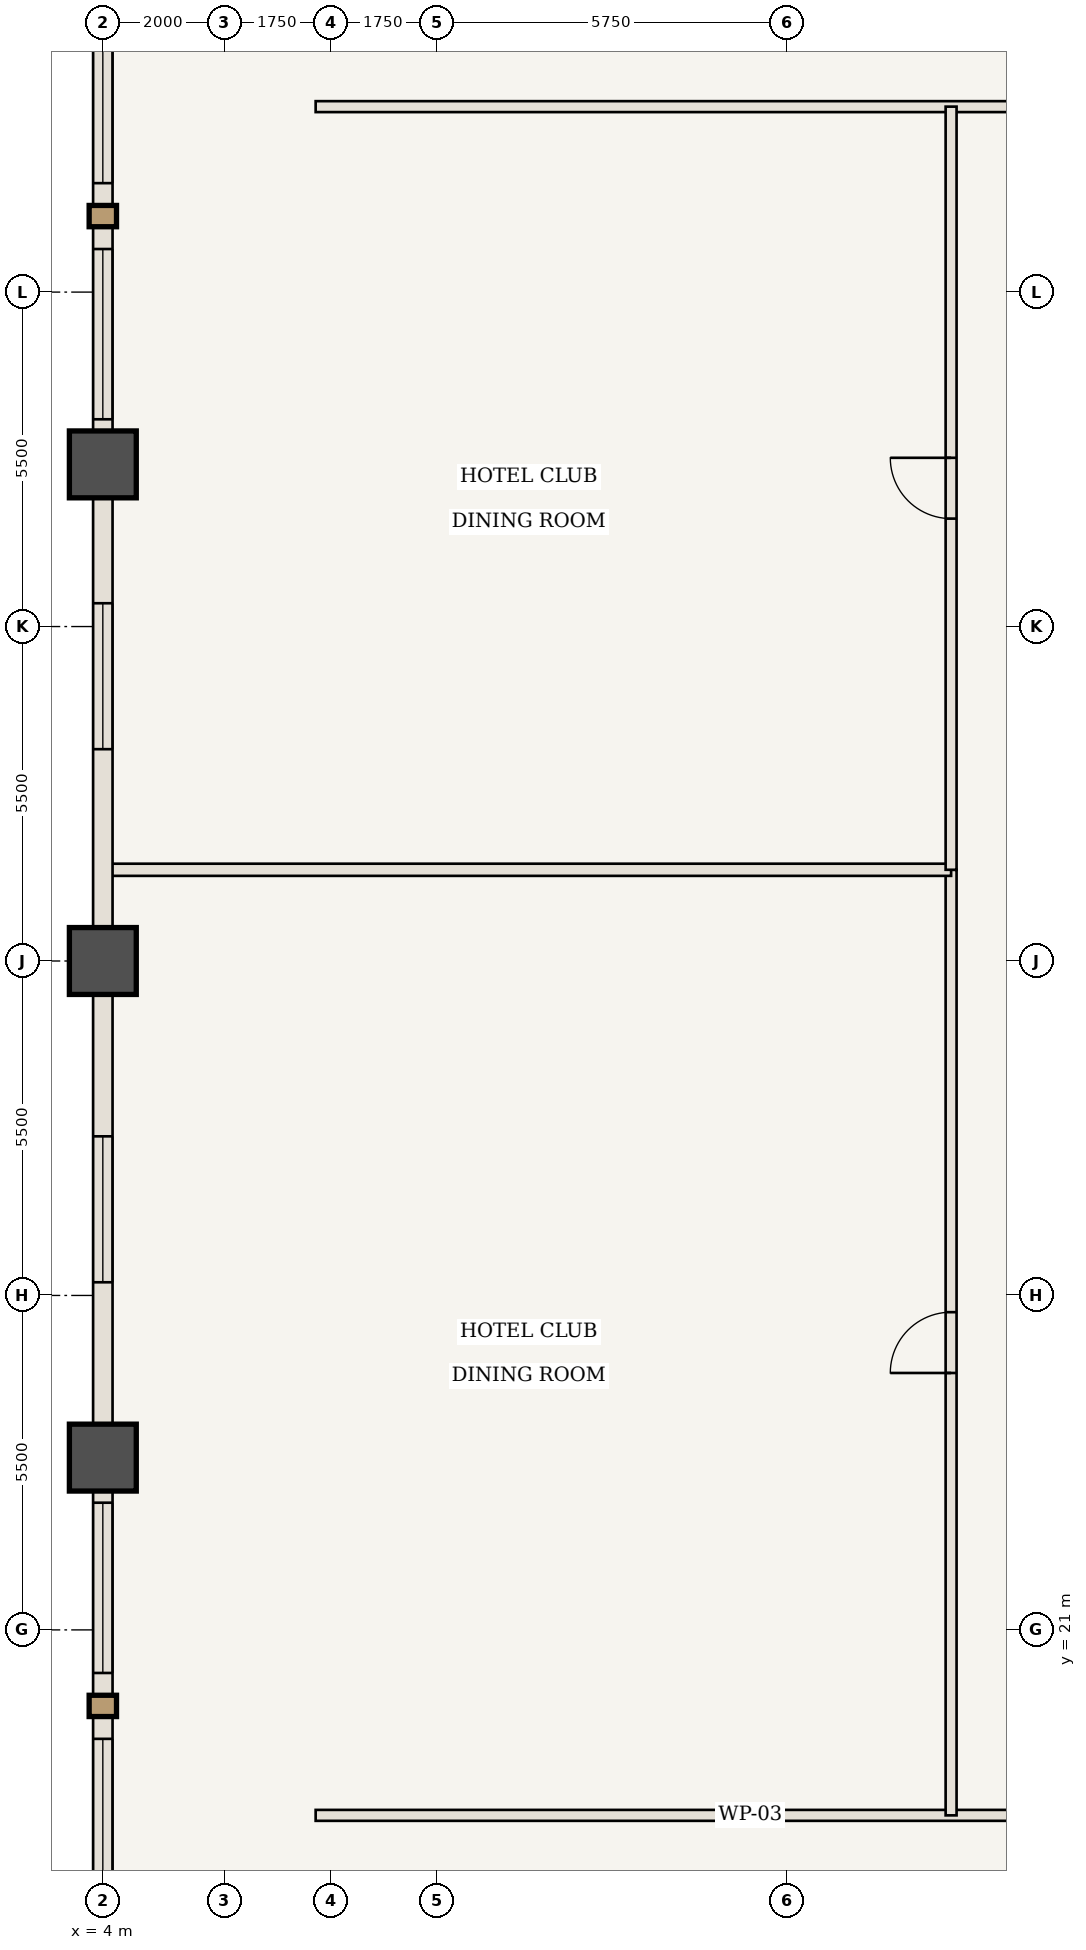
"""IFC4 building model, lengths in metres.
Left out: names, types, materials, properties, quantities, classifications, styles, units other than length and angle.
Written with IfcOpenShell. Run it as: python <this file> out.ifc"""

import sys

from ifc_helpers import new_model, si_unit, direction, frame, frame_2d, origin, origin_2d, place, context, subcontext, project, spatial, rectangle, extrude, element, fill, save


model = new_model("IFC4")
c1 = context("Model", 3, precision=1e-05, world=origin(), true_north=direction((0.0, 1.0)))
c2 = subcontext(c1, "Body", "Model", "MODEL_VIEW")
j1 = project(units=[si_unit("LENGTHUNIT", "METRE"), si_unit("PLANEANGLEUNIT", "RADIAN")], contexts=[c1])
p1 = place(None, origin())
s1 = spatial("IfcSite", under=j1, at=p1, CompositionType="ELEMENT")
p2 = place(p1, origin())
s2 = spatial("IfcBuilding", under=s1, at=p2, CompositionType="ELEMENT")
p3 = place(p2, frame((0.0, 0.0, 66.85)))
s3 = spatial("IfcBuildingStorey", under=s2, at=p3, CompositionType="ELEMENT", Elevation=66.85)
for number, where, z_axis, x_axis in (
    (1, (4.0, 23.833, 0.0), (0.0, 0.0, 1.0), (1.0, 0.0, 0.0)),
    (2, (4.0, 32.0, 0.0), (0.0, 0.0, 1.0), (1.0, 0.0, 0.0)),
    (3, (4.0, 40.167, 0.0), (0.0, 0.0, 1.0), (1.0, 0.0, 0.0)),
):
    element("IfcColumn", number, at=place(p3, frame(where, z_axis=z_axis, x_axis=x_axis)), inside=s3, PredefinedType="COLUMN", context=c2, shape_type="SweptSolid", body=[
        extrude(rectangle(XDim=1.1, YDim=1.1, at=origin_2d()), origin(), (0.0, 0.0, 1.0), 3.5),
    ])
p4 = place(p3, frame((7.5, 17.95, 0.0), z_axis=(0.0, 0.0, 1.0), x_axis=(1.0, 0.0, 0.0)))
e4 = element("IfcWall", 4, at=p4, inside=s3, PredefinedType="STANDARD", context=c2, shape_type="SweptSolid", body=[
    extrude(rectangle(XDim=14.3, YDim=0.18, at=frame_2d((7.15, 0.0))), origin(), (0.0, 0.0, 1.0), 3.32),
])
p5 = place(p4, frame((11.9, 0.0, 0.0)))
e5 = element("IfcOpeningElement", 5, at=p5, cuts=e4, PredefinedType="OPENING", context=c2, shape_type="SweptSolid", body=[
    extrude(rectangle(XDim=1.0, YDim=2.15, at=frame_2d((0.5, 1.075))), frame((0.0, 0.1, 0.0), z_axis=(0.0, -1.0, 0.0), x_axis=(1.0, 0.0, 0.0)), (0.0, 0.0, 1.0), 0.2),
])
p6 = place(p3, frame((7.5, 46.05, 0.0), z_axis=(0.0, 0.0, 1.0), x_axis=(1.0, 0.0, 0.0)))
e6 = element("IfcWall", 6, at=p6, inside=s3, PredefinedType="STANDARD", context=c2, shape_type="SweptSolid", body=[
    extrude(rectangle(XDim=16.7, YDim=0.18, at=frame_2d((8.35, 0.0))), origin(), (0.0, 0.0, 1.0), 3.32),
])
p7 = place(p6, frame((11.65, 0.0, 0.0)))
e7 = element("IfcOpeningElement", 7, at=p7, cuts=e6, PredefinedType="OPENING", context=c2, shape_type="SweptSolid", body=[
    extrude(rectangle(XDim=1.0, YDim=2.15, at=frame_2d((0.5, 1.075))), frame((0.0, 0.1, 0.0), z_axis=(0.0, -1.0, 0.0), x_axis=(1.0, 0.0, 0.0)), (0.0, 0.0, 1.0), 0.2),
])
p8 = place(p3, frame((17.95, 17.95, 0.0), z_axis=(0.0, 0.0, 1.0), x_axis=(0.0, 1.0, 0.0)))
e8 = element("IfcWall", 8, at=p8, inside=s3, PredefinedType="STANDARD", context=c2, shape_type="SweptSolid", body=[
    extrude(rectangle(XDim=15.55, YDim=0.18, at=frame_2d((7.775, 0.0))), origin(), (0.0, 0.0, 1.0), 3.32),
])
p9 = place(p8, frame((7.275, 0.0, 0.0)))
e9 = element("IfcOpeningElement", 9, at=p9, cuts=e8, PredefinedType="OPENING", context=c2, shape_type="SweptSolid", body=[
    extrude(rectangle(XDim=1.0, YDim=2.15, at=frame_2d((0.5, 1.075))), frame((0.0, 0.1, 0.0), z_axis=(0.0, -1.0, 0.0), x_axis=(1.0, 0.0, 0.0)), (0.0, 0.0, 1.0), 0.2),
])
p10 = place(p3, frame((4.06, 33.5, 0.0), z_axis=(0.0, 0.0, 1.0), x_axis=(1.0, 0.0, 0.0)))
e10 = element("IfcWall", 10, at=p10, inside=s3, PredefinedType="STANDARD", context=c2, shape_type="SweptSolid", body=[
    extrude(rectangle(XDim=13.89, YDim=0.2, at=frame_2d((6.945, 0.0))), origin(), (0.0, 0.0, 1.0), 3.32),
])
p11 = place(p3, frame((17.95, 33.5, 0.0), z_axis=(0.0, 0.0, 1.0), x_axis=(0.0, 1.0, 0.0)))
e11 = element("IfcWall", 11, at=p11, inside=s3, PredefinedType="STANDARD", context=c2, shape_type="SweptSolid", body=[
    extrude(rectangle(XDim=12.55, YDim=0.18, at=frame_2d((6.275, 0.0))), origin(), (0.0, 0.0, 1.0), 3.32),
])
p12 = place(p11, frame((5.775, 0.0, 0.0)))
e12 = element("IfcOpeningElement", 12, at=p12, cuts=e11, PredefinedType="OPENING", context=c2, shape_type="SweptSolid", body=[
    extrude(rectangle(XDim=1.0, YDim=2.15, at=frame_2d((0.5, 1.075))), frame((0.0, 0.1, 0.0), z_axis=(0.0, -1.0, 0.0), x_axis=(1.0, 0.0, 0.0)), (0.0, 0.0, 1.0), 0.2),
])
p13 = place(p3, frame((4.0, 15.667, 0.0), z_axis=(0.0, 0.0, 1.0), x_axis=(0.0, 1.0, 0.0)))
e13 = element("IfcWall", 13, at=p13, inside=s3, PredefinedType="USERDEFINED", context=c2, shape_type="SweptSolid", body=[
    extrude(rectangle(XDim=8.167, YDim=0.32, at=frame_2d((4.083, 0.0))), origin(), (0.0, 0.0, 1.0), 2.52),
])
p14 = place(p13, frame((0.742, 0.0, 0.85)))
e14 = element("IfcOpeningElement", 14, at=p14, cuts=e13, PredefinedType="OPENING", context=c2, shape_type="SweptSolid", body=[
    extrude(rectangle(XDim=2.8, YDim=1.47, at=frame_2d((1.4, 0.735))), frame((0.0, 0.17, 0.0), z_axis=(0.0, -1.0, 0.0), x_axis=(1.0, 0.0, 0.0)), (0.0, 0.0, 1.0), 0.34),
])
p15 = place(p13, frame((4.625, 0.0, 0.85)))
e15 = element("IfcOpeningElement", 15, at=p15, cuts=e13, PredefinedType="OPENING", context=c2, shape_type="SweptSolid", body=[
    extrude(rectangle(XDim=2.8, YDim=1.47, at=frame_2d((1.4, 0.735))), frame((0.0, 0.17, 0.0), z_axis=(0.0, -1.0, 0.0), x_axis=(1.0, 0.0, 0.0)), (0.0, 0.0, 1.0), 0.34),
])
p16 = place(p3, frame((4.0, 23.833, 0.0), z_axis=(0.0, 0.0, 1.0), x_axis=(0.0, 1.0, 0.0)))
e16 = element("IfcWall", 16, at=p16, inside=s3, PredefinedType="USERDEFINED", context=c2, shape_type="SweptSolid", body=[
    extrude(rectangle(XDim=8.167, YDim=0.32, at=frame_2d((4.083, 0.0))), origin(), (0.0, 0.0, 1.0), 2.52),
])
p17 = place(p16, frame((2.883, 0.0, 0.85)))
e17 = element("IfcOpeningElement", 17, at=p17, cuts=e16, PredefinedType="OPENING", context=c2, shape_type="SweptSolid", body=[
    extrude(rectangle(XDim=2.4, YDim=1.47, at=frame_2d((1.2, 0.735))), frame((0.0, 0.17, 0.0), z_axis=(0.0, -1.0, 0.0), x_axis=(1.0, 0.0, 0.0)), (0.0, 0.0, 1.0), 0.34),
])
p18 = place(p3, frame((4.0, 32.0, 0.0), z_axis=(0.0, 0.0, 1.0), x_axis=(0.0, 1.0, 0.0)))
e18 = element("IfcWall", 18, at=p18, inside=s3, PredefinedType="USERDEFINED", context=c2, shape_type="SweptSolid", body=[
    extrude(rectangle(XDim=8.167, YDim=0.32, at=frame_2d((4.083, 0.0))), origin(), (0.0, 0.0, 1.0), 2.52),
])
p19 = place(p18, frame((3.483, 0.0, 0.85)))
e19 = element("IfcOpeningElement", 19, at=p19, cuts=e18, PredefinedType="OPENING", context=c2, shape_type="SweptSolid", body=[
    extrude(rectangle(XDim=2.4, YDim=1.47, at=frame_2d((1.2, 0.735))), frame((0.0, 0.17, 0.0), z_axis=(0.0, -1.0, 0.0), x_axis=(1.0, 0.0, 0.0)), (0.0, 0.0, 1.0), 0.34),
])
p20 = place(p3, frame((4.0, 40.167, 0.0), z_axis=(0.0, 0.0, 1.0), x_axis=(0.0, 1.0, 0.0)))
e20 = element("IfcWall", 20, at=p20, inside=s3, PredefinedType="USERDEFINED", context=c2, shape_type="SweptSolid", body=[
    extrude(rectangle(XDim=8.167, YDim=0.32, at=frame_2d((4.083, 0.0))), origin(), (0.0, 0.0, 1.0), 2.52),
])
p21 = place(p20, frame((0.742, 0.0, 0.85)))
e21 = element("IfcOpeningElement", 21, at=p21, cuts=e20, PredefinedType="OPENING", context=c2, shape_type="SweptSolid", body=[
    extrude(rectangle(XDim=2.8, YDim=1.47, at=frame_2d((1.4, 0.735))), frame((0.0, 0.17, 0.0), z_axis=(0.0, -1.0, 0.0), x_axis=(1.0, 0.0, 0.0)), (0.0, 0.0, 1.0), 0.34),
])
p22 = place(p20, frame((4.625, 0.0, 0.85)))
e22 = element("IfcOpeningElement", 22, at=p22, cuts=e20, PredefinedType="OPENING", context=c2, shape_type="SweptSolid", body=[
    extrude(rectangle(XDim=2.8, YDim=1.47, at=frame_2d((1.4, 0.735))), frame((0.0, 0.17, 0.0), z_axis=(0.0, -1.0, 0.0), x_axis=(1.0, 0.0, 0.0)), (0.0, 0.0, 1.0), 0.34),
])
p23 = place(p9, origin())
e23 = element("IfcDoor", 23, at=p23, inside=s3, OperationType="SINGLE_SWING_LEFT", PredefinedType="DOOR", context=c2, shape_type="SweptSolid", body=[
    extrude(rectangle(XDim=1.0, YDim=2.15, at=frame_2d((0.5, 1.075))), frame((0.0, 0.025, 0.0), z_axis=(0.0, -1.0, 0.0), x_axis=(1.0, 0.0, 0.0)), (0.0, 0.0, 1.0), 0.05),
])
fill(e9, e23)
p24 = place(p12, origin())
e24 = element("IfcDoor", 24, at=p24, inside=s3, OperationType="SINGLE_SWING_RIGHT", PredefinedType="DOOR", context=c2, shape_type="SweptSolid", body=[
    extrude(rectangle(XDim=1.0, YDim=2.15, at=frame_2d((0.5, 1.075))), frame((0.0, 0.025, 0.0), z_axis=(0.0, -1.0, 0.0), x_axis=(1.0, 0.0, 0.0)), (0.0, 0.0, 1.0), 0.05),
])
fill(e12, e24)
p25 = place(p14, origin())
e25 = element("IfcWindow", 25, at=p25, inside=s3, PartitioningType="SINGLE_PANEL", PredefinedType="WINDOW", context=c2, shape_type="SweptSolid", body=[
    extrude(rectangle(XDim=2.8, YDim=1.47, at=frame_2d((1.4, 0.735))), frame((0.0, 0.03, 0.0), z_axis=(0.0, -1.0, 0.0), x_axis=(1.0, 0.0, 0.0)), (0.0, 0.0, 1.0), 0.06),
])
fill(e14, e25)
p26 = place(p15, origin())
e26 = element("IfcWindow", 26, at=p26, inside=s3, PartitioningType="SINGLE_PANEL", PredefinedType="WINDOW", context=c2, shape_type="SweptSolid", body=[
    extrude(rectangle(XDim=2.8, YDim=1.47, at=frame_2d((1.4, 0.735))), frame((0.0, 0.03, 0.0), z_axis=(0.0, -1.0, 0.0), x_axis=(1.0, 0.0, 0.0)), (0.0, 0.0, 1.0), 0.06),
])
fill(e15, e26)
p27 = place(p17, origin())
e27 = element("IfcWindow", 27, at=p27, inside=s3, PartitioningType="SINGLE_PANEL", PredefinedType="WINDOW", context=c2, shape_type="SweptSolid", body=[
    extrude(rectangle(XDim=2.4, YDim=1.47, at=frame_2d((1.2, 0.735))), frame((0.0, 0.03, 0.0), z_axis=(0.0, -1.0, 0.0), x_axis=(1.0, 0.0, 0.0)), (0.0, 0.0, 1.0), 0.06),
])
fill(e17, e27)
p28 = place(p19, origin())
e28 = element("IfcWindow", 28, at=p28, inside=s3, PartitioningType="SINGLE_PANEL", PredefinedType="WINDOW", context=c2, shape_type="SweptSolid", body=[
    extrude(rectangle(XDim=2.4, YDim=1.47, at=frame_2d((1.2, 0.735))), frame((0.0, 0.03, 0.0), z_axis=(0.0, -1.0, 0.0), x_axis=(1.0, 0.0, 0.0)), (0.0, 0.0, 1.0), 0.06),
])
fill(e19, e28)
p29 = place(p21, origin())
e29 = element("IfcWindow", 29, at=p29, inside=s3, PartitioningType="SINGLE_PANEL", PredefinedType="WINDOW", context=c2, shape_type="SweptSolid", body=[
    extrude(rectangle(XDim=2.8, YDim=1.47, at=frame_2d((1.4, 0.735))), frame((0.0, 0.03, 0.0), z_axis=(0.0, -1.0, 0.0), x_axis=(1.0, 0.0, 0.0)), (0.0, 0.0, 1.0), 0.06),
])
fill(e21, e29)
p30 = place(p22, origin())
e30 = element("IfcWindow", 30, at=p30, inside=s3, PartitioningType="SINGLE_PANEL", PredefinedType="WINDOW", context=c2, shape_type="SweptSolid", body=[
    extrude(rectangle(XDim=2.8, YDim=1.47, at=frame_2d((1.4, 0.735))), frame((0.0, 0.03, 0.0), z_axis=(0.0, -1.0, 0.0), x_axis=(1.0, 0.0, 0.0)), (0.0, 0.0, 1.0), 0.06),
])
fill(e22, e30)
save(model, sys.argv[1])
